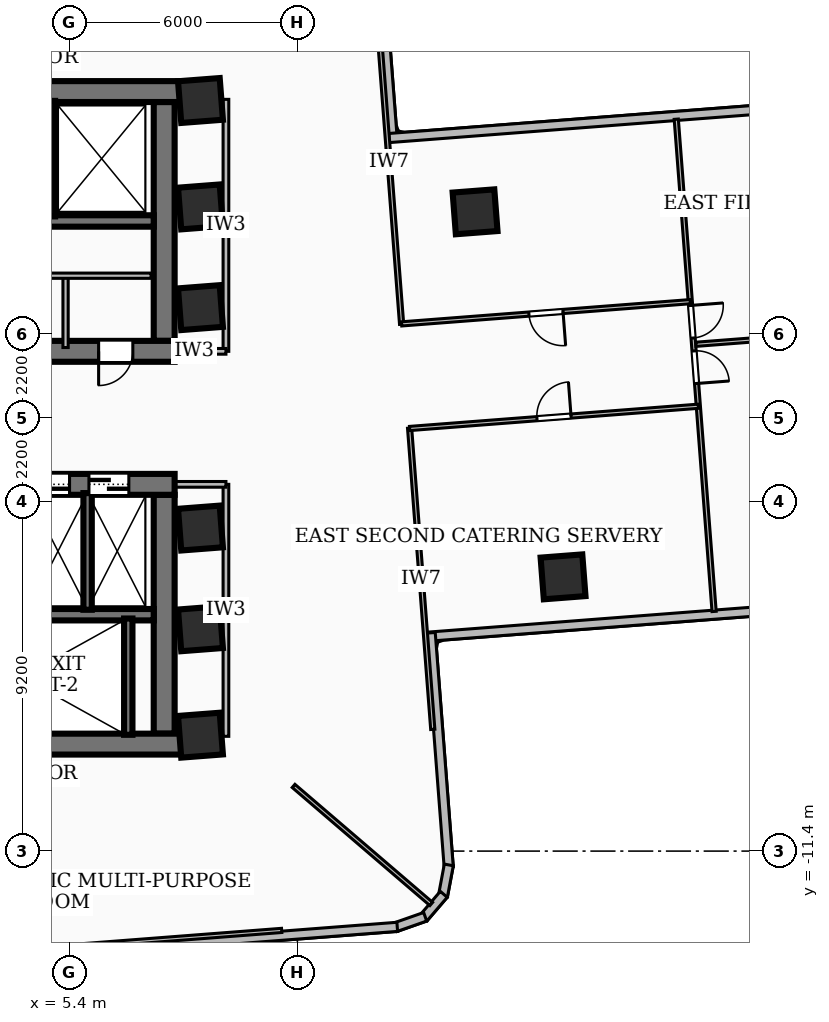
"""IFC4 building model, lengths in metres.
Left out: names, types, materials, properties, quantities, classifications, styles, units other than length and angle.
Written with IfcOpenShell. Run it as: python <this file> out.ifc"""

import sys

from ifc_helpers import new_model, si_unit, direction, frame, frame_2d, origin, origin_2d, place, context, subcontext, project, spatial, rectangle, extrude, element, fill, save


model = new_model("IFC4")
c1 = context("Model", 3, precision=1e-05, world=origin(), true_north=direction((0.0, 1.0)))
c2 = subcontext(c1, "Body", "Model", "MODEL_VIEW")
j1 = project(units=[si_unit("LENGTHUNIT", "METRE"), si_unit("PLANEANGLEUNIT", "RADIAN")], contexts=[c1])
p1 = place(None, origin())
s1 = spatial("IfcSite", under=j1, at=p1, CompositionType="ELEMENT")
p2 = place(p1, origin())
s2 = spatial("IfcBuilding", under=s1, at=p2, CompositionType="ELEMENT")
p3 = place(p2, frame((0.0, 0.0, 56.88)))
s3 = spatial("IfcBuildingStorey", under=s2, at=p3, CompositionType="ELEMENT", Elevation=56.88)
p4 = place(p3, frame((-8.78, 8.585, 0.0), z_axis=(0.0, 0.0, 1.0), x_axis=(1.0, 0.0, 0.0)))
e1 = element("IfcWall", 1, at=p4, inside=s3, PredefinedType="SHEAR", context=c2, shape_type="SweptSolid", body=[
    extrude(rectangle(XDim=17.56, YDim=0.55, at=frame_2d((8.78, 0.0))), origin(), (0.0, 0.0, 1.0), 3.32),
])
p5 = place(p3, frame((8.17, 1.75, 0.0), z_axis=(0.0, 0.0, 1.0), x_axis=(-1.0, 0.0, 0.0)))
e2 = element("IfcWall", 2, at=p5, inside=s3, PredefinedType="SHEAR", context=c2, shape_type="SweptSolid", body=[
    extrude(rectangle(XDim=16.34, YDim=0.55, at=frame_2d((8.17, 0.0))), origin(), (0.0, 0.0, 1.0), 3.32),
])
p6 = place(p5, frame((7.45, 0.0, 0.0)))
e3 = element("IfcOpeningElement", 3, at=p6, cuts=e2, PredefinedType="OPENING", context=c2, shape_type="SweptSolid", body=[
    extrude(rectangle(XDim=1.0, YDim=2.1, at=frame_2d((0.5, 1.05))), frame((0.0, 0.285, 0.0), z_axis=(0.0, -1.0, 0.0), x_axis=(1.0, 0.0, 0.0)), (0.0, 0.0, 1.0), 0.57),
])
p7 = place(p5, frame((3.4, 0.0, 0.0)))
e4 = element("IfcOpeningElement", 4, at=p7, cuts=e2, PredefinedType="OPENING", context=c2, shape_type="SweptSolid", body=[
    extrude(rectangle(XDim=0.9, YDim=2.06, at=frame_2d((0.45, 1.03))), frame((0.0, 0.285, 0.0), z_axis=(0.0, -1.0, 0.0), x_axis=(1.0, 0.0, 0.0)), (0.0, 0.0, 1.0), 0.57),
])
p8 = place(p5, frame((1.1, 0.0, 0.0)))
e5 = element("IfcOpeningElement", 5, at=p8, cuts=e2, PredefinedType="OPENING", context=c2, shape_type="SweptSolid", body=[
    extrude(rectangle(XDim=0.9, YDim=2.06, at=frame_2d((0.45, 1.03))), frame((0.0, 0.285, 0.0), z_axis=(0.0, -1.0, 0.0), x_axis=(1.0, 0.0, 0.0)), (0.0, 0.0, 1.0), 0.57),
])
p9 = place(p3, frame((7.895, 8.31, 0.0), z_axis=(0.0, 0.0, 1.0), x_axis=(0.0, -1.0, 0.0)))
e6 = element("IfcWall", 6, at=p9, inside=s3, PredefinedType="SHEAR", context=c2, shape_type="SweptSolid", body=[
    extrude(rectangle(XDim=6.285, YDim=0.55, at=frame_2d((3.143, 0.0))), origin(), (0.0, 0.0, 1.0), 3.32),
])
p10 = place(p3, frame((7.62, 5.18, 0.0), z_axis=(0.0, 0.0, 1.0), x_axis=(-1.0, 0.0, 0.0)))
e7 = element("IfcWall", 7, at=p10, inside=s3, PredefinedType="SOLIDWALL", context=c2, shape_type="SweptSolid", body=[
    extrude(rectangle(XDim=15.24, YDim=0.3, at=frame_2d((7.62, 0.0))), origin(), (0.0, 0.0, 1.0), 3.32),
])
p11 = place(p10, frame((5.77, 0.0, 0.0)))
e8 = element("IfcOpeningElement", 8, at=p11, cuts=e7, PredefinedType="OPENING", context=c2, shape_type="SweptSolid", body=[
    extrude(rectangle(XDim=1.1, YDim=2.15, at=frame_2d((0.55, 1.075))), frame((0.0, 0.16, 0.0), z_axis=(0.0, -1.0, 0.0), x_axis=(1.0, 0.0, 0.0)), (0.0, 0.0, 1.0), 0.32),
])
p12 = place(p10, frame((2.97, 0.0, 0.0)))
e9 = element("IfcOpeningElement", 9, at=p12, cuts=e7, PredefinedType="OPENING", context=c2, shape_type="SweptSolid", body=[
    extrude(rectangle(XDim=1.1, YDim=2.15, at=frame_2d((0.55, 1.075))), frame((0.0, 0.16, 0.0), z_axis=(0.0, -1.0, 0.0), x_axis=(1.0, 0.0, 0.0)), (0.0, 0.0, 1.0), 0.32),
])
p13 = place(p10, frame((7.97, 0.0, 0.0)))
e10 = element("IfcOpeningElement", 10, at=p13, cuts=e7, PredefinedType="OPENING", context=c2, shape_type="SweptSolid", body=[
    extrude(rectangle(XDim=1.0, YDim=2.1, at=frame_2d((0.5, 1.05))), frame((0.0, 0.16, 0.0), z_axis=(0.0, -1.0, 0.0), x_axis=(1.0, 0.0, 0.0)), (0.0, 0.0, 1.0), 0.32),
])
p14 = place(p3, frame((8.78, -8.585, 0.0), z_axis=(0.0, 0.0, 1.0), x_axis=(-1.0, 0.0, 0.0)))
e11 = element("IfcWall", 11, at=p14, inside=s3, PredefinedType="SHEAR", context=c2, shape_type="SweptSolid", body=[
    extrude(rectangle(XDim=17.56, YDim=0.55, at=frame_2d((8.78, 0.0))), origin(), (0.0, 0.0, 1.0), 3.32),
])
p15 = place(p3, frame((-8.17, -1.75, 0.0), z_axis=(0.0, 0.0, 1.0), x_axis=(1.0, 0.0, 0.0)))
e12 = element("IfcWall", 12, at=p15, inside=s3, PredefinedType="SHEAR", context=c2, shape_type="SweptSolid", body=[
    extrude(rectangle(XDim=16.34, YDim=0.55, at=frame_2d((8.17, 0.0))), origin(), (0.0, 0.0, 1.0), 3.32),
])
p16 = place(p15, frame((7.45, 0.0, 0.0)))
e13 = element("IfcOpeningElement", 13, at=p16, cuts=e12, PredefinedType="OPENING", context=c2, shape_type="SweptSolid", body=[
    extrude(rectangle(XDim=1.0, YDim=2.1, at=frame_2d((0.5, 1.05))), frame((0.0, 0.285, 0.0), z_axis=(0.0, -1.0, 0.0), x_axis=(1.0, 0.0, 0.0)), (0.0, 0.0, 1.0), 0.57),
])
p17 = place(p15, frame((10.965, 0.0, 0.0)))
e14 = element("IfcOpeningElement", 14, at=p17, cuts=e12, PredefinedType="OPENING", context=c2, shape_type="SweptSolid", body=[
    extrude(rectangle(XDim=1.05, YDim=2.15, at=frame_2d((0.525, 1.075))), frame((0.0, 0.285, 0.0), z_axis=(0.0, -1.0, 0.0), x_axis=(1.0, 0.0, 0.0)), (0.0, 0.0, 1.0), 0.57),
])
p18 = place(p15, frame((12.525, 0.0, 0.0)))
e15 = element("IfcOpeningElement", 15, at=p18, cuts=e12, PredefinedType="OPENING", context=c2, shape_type="SweptSolid", body=[
    extrude(rectangle(XDim=1.05, YDim=2.15, at=frame_2d((0.525, 1.075))), frame((0.0, 0.285, 0.0), z_axis=(0.0, -1.0, 0.0), x_axis=(1.0, 0.0, 0.0)), (0.0, 0.0, 1.0), 0.57),
])
p19 = place(p15, frame((14.085, 0.0, 0.0)))
e16 = element("IfcOpeningElement", 16, at=p19, cuts=e12, PredefinedType="OPENING", context=c2, shape_type="SweptSolid", body=[
    extrude(rectangle(XDim=1.05, YDim=2.15, at=frame_2d((0.525, 1.075))), frame((0.0, 0.285, 0.0), z_axis=(0.0, -1.0, 0.0), x_axis=(1.0, 0.0, 0.0)), (0.0, 0.0, 1.0), 0.57),
])
p20 = place(p3, frame((7.895, -2.025, 0.0), z_axis=(0.0, 0.0, 1.0), x_axis=(0.0, -1.0, 0.0)))
e17 = element("IfcWall", 17, at=p20, inside=s3, PredefinedType="SHEAR", context=c2, shape_type="SweptSolid", body=[
    extrude(rectangle(XDim=6.285, YDim=0.55, at=frame_2d((3.143, 0.0))), origin(), (0.0, 0.0, 1.0), 3.32),
])
p21 = place(p3, frame((-7.62, -5.18, 0.0), z_axis=(0.0, 0.0, 1.0), x_axis=(1.0, 0.0, 0.0)))
e18 = element("IfcWall", 18, at=p21, inside=s3, PredefinedType="SOLIDWALL", context=c2, shape_type="SweptSolid", body=[
    extrude(rectangle(XDim=15.24, YDim=0.3, at=frame_2d((7.62, 0.0))), origin(), (0.0, 0.0, 1.0), 3.32),
])
p22 = place(p21, frame((5.77, 0.0, 0.0)))
e19 = element("IfcOpeningElement", 19, at=p22, cuts=e18, PredefinedType="OPENING", context=c2, shape_type="SweptSolid", body=[
    extrude(rectangle(XDim=1.1, YDim=2.15, at=frame_2d((0.55, 1.075))), frame((0.0, 0.16, 0.0), z_axis=(0.0, -1.0, 0.0), x_axis=(1.0, 0.0, 0.0)), (0.0, 0.0, 1.0), 0.32),
])
p23 = place(p21, frame((7.97, 0.0, 0.0)))
e20 = element("IfcOpeningElement", 20, at=p23, cuts=e18, PredefinedType="OPENING", context=c2, shape_type="SweptSolid", body=[
    extrude(rectangle(XDim=1.0, YDim=2.1, at=frame_2d((0.5, 1.05))), frame((0.0, 0.16, 0.0), z_axis=(0.0, -1.0, 0.0), x_axis=(1.0, 0.0, 0.0)), (0.0, 0.0, 1.0), 0.32),
])
p24 = place(p3, frame((6.95, -8.34, 0.0), z_axis=(0.0, 0.0, 1.0), x_axis=(0.0, 1.0, 0.0)))
e21 = element("IfcWall", 21, at=p24, inside=s3, PredefinedType="SOLIDWALL", context=c2, shape_type="SweptSolid", body=[
    extrude(rectangle(XDim=3.06, YDim=0.22, at=frame_2d((1.53, 0.0))), origin(), (0.0, 0.0, 1.0), 3.32),
])
p25 = place(p3, frame((4.9, 5.3, 0.0), z_axis=(0.0, 0.0, 1.0), x_axis=(0.0, 1.0, 0.0)))
e22 = element("IfcWall", 22, at=p25, inside=s3, PredefinedType="SOLIDWALL", context=c2, shape_type="SweptSolid", body=[
    extrude(rectangle(XDim=3.04, YDim=0.25, at=frame_2d((1.52, 0.0))), origin(), (0.0, 0.0, 1.0), 3.32),
])
p26 = place(p3, frame((5.88, -5.05, 0.0), z_axis=(0.0, 0.0, 1.0), x_axis=(0.0, 1.0, 0.0)))
e23 = element("IfcWall", 23, at=p26, inside=s3, PredefinedType="SOLIDWALL", context=c2, shape_type="SweptSolid", body=[
    extrude(rectangle(XDim=3.07, YDim=0.22, at=frame_2d((1.535, 0.0))), origin(), (0.0, 0.0, 1.0), 3.32),
])
for number, where, z_axis, x_axis in (
    (24, (8.85, -5.55, 0.0), (0.0, 0.0, 1.0), (0.997, 0.077, 0.0)),
    (25, (8.85, -2.9, 0.0), (0.0, 0.0, 1.0), (0.997, 0.077, 0.0)),
    (26, (8.85, 2.9, 0.0), (0.0, 0.0, 1.0), (0.997, 0.077, 0.0)),
    (27, (8.85, 5.55, 0.0), (0.0, 0.0, 1.0), (0.997, 0.077, 0.0)),
    (28, (8.85, -8.35, 0.0), (0.0, 0.0, 1.0), (0.997, 0.077, 0.0)),
    (29, (8.85, 8.35, 0.0), (0.0, 0.0, 1.0), (0.997, 0.077, 0.0)),
    (30, (18.391, -4.184, 0.0), (0.0, 0.0, 1.0), (0.997, 0.077, 0.0)),
    (31, (16.076, 5.421, 0.0), (0.0, 0.0, 1.0), (0.997, 0.077, 0.0)),
):
    element("IfcColumn", number, at=place(p3, frame(where, z_axis=z_axis, x_axis=x_axis)), inside=s3, PredefinedType="COLUMN", context=c2, shape_type="SweptSolid", body=[
        extrude(rectangle(XDim=1.1, YDim=1.1, at=origin_2d()), origin(), (0.0, 0.0, 1.0), 3.6),
    ])
p27 = place(p3, frame((13.393, 14.028, 0.0), z_axis=(0.0, 0.0, 1.0), x_axis=(0.076754366588, -0.997050032451, 0.0)))
e32 = element("IfcWall", 32, at=p27, inside=s3, PredefinedType="SOLIDWALL", context=c2, shape_type="SweptSolid", body=[
    extrude(rectangle(XDim=6.775, YDim=0.24, at=frame_2d((3.388, 0.0))), origin(), (0.0, 0.0, 1.0), 3.32),
])
p28 = place(p3, frame((13.81, 7.362, 0.0), z_axis=(0.0, 0.0, 1.0), x_axis=(0.997055761943, 0.076679903335, 0.0)))
e33 = element("IfcWall", 33, at=p28, inside=s3, PredefinedType="SOLIDWALL", context=c2, shape_type="SweptSolid", body=[
    extrude(rectangle(XDim=16.875, YDim=0.24, at=frame_2d((8.438, 0.0))), origin(), (0.0, 0.0, 1.0), 3.32),
])
p29 = place(p28, frame((13.375, 0.0, 0.85)))
e34 = element("IfcOpeningElement", 34, at=p29, cuts=e33, PredefinedType="OPENING", context=c2, shape_type="SweptSolid", body=[
    extrude(rectangle(XDim=2.4, YDim=1.65, at=frame_2d((1.2, 0.825))), frame((0.0, 0.13, 0.0), z_axis=(0.0, -1.0, 0.0), x_axis=(1.0, 0.0, 0.0)), (0.0, 0.0, 1.0), 0.26),
])
p30 = place(p3, frame((31.645, -4.465, 0.0), z_axis=(0.0, 0.0, 1.0), x_axis=(-0.997051676532, -0.076733006752, 0.0)))
e35 = element("IfcWall", 35, at=p30, inside=s3, PredefinedType="SOLIDWALL", context=c2, shape_type="SweptSolid", body=[
    extrude(rectangle(XDim=16.876, YDim=0.24, at=frame_2d((8.438, 0.0))), origin(), (0.0, 0.0, 1.0), 3.32),
])
p31 = place(p30, frame((1.1, 0.0, 0.85)))
e36 = element("IfcOpeningElement", 36, at=p31, cuts=e35, PredefinedType="OPENING", context=c2, shape_type="SweptSolid", body=[
    extrude(rectangle(XDim=1.8, YDim=2.0, at=frame_2d((0.9, 1.0))), frame((0.0, 0.13, 0.0), z_axis=(0.0, -1.0, 0.0), x_axis=(1.0, 0.0, 0.0)), (0.0, 0.0, 1.0), 0.26),
])
p32 = place(p3, frame((14.908, -5.657, 0.0), z_axis=(0.0, 0.0, 1.0), x_axis=(0.076778128006, -0.997048202977, 0.0)))
e37 = element("IfcWall", 37, at=p32, inside=s3, PredefinedType="SOLIDWALL", context=c2, shape_type="SweptSolid", body=[
    extrude(rectangle(XDim=6.175, YDim=0.24, at=frame_2d((3.088, 0.0))), origin(), (0.0, 0.0, 1.0), 3.32),
])
p33 = place(p3, frame((15.385, -11.764, 0.0), z_axis=(0.0, 0.0, 1.0), x_axis=(-0.185263427582, -0.982688894005, 0.0)))
e38 = element("IfcWall", 38, at=p33, inside=s3, PredefinedType="SOLIDWALL", context=c2, shape_type="SweptSolid", body=[
    extrude(rectangle(XDim=0.832, YDim=0.24, at=frame_2d((0.416, 0.0))), origin(), (0.0, 0.0, 1.0), 3.32),
])
p34 = place(p3, frame((15.252, -12.537, 0.0), z_axis=(0.0, 0.0, 1.0), x_axis=(-0.650371098657, -0.759616636226, 0.0)))
e39 = element("IfcWall", 39, at=p34, inside=s3, PredefinedType="SOLIDWALL", context=c2, shape_type="SweptSolid", body=[
    extrude(rectangle(XDim=0.813, YDim=0.24, at=frame_2d((0.407, 0.0))), origin(), (0.0, 0.0, 1.0), 3.32),
])
p35 = place(p3, frame((14.763, -13.128, 0.0), z_axis=(0.0, 0.0, 1.0), x_axis=(-0.943569376564, -0.331174926, 0.0)))
e40 = element("IfcWall", 40, at=p35, inside=s3, PredefinedType="SOLIDWALL", context=c2, shape_type="SweptSolid", body=[
    extrude(rectangle(XDim=0.831, YDim=0.24, at=frame_2d((0.416, 0.0))), origin(), (0.0, 0.0, 1.0), 3.32),
])
p36 = place(p3, frame((14.028, -13.393, 0.0), z_axis=(0.0, 0.0, 1.0), x_axis=(-0.997050032451, -0.076754366588, 0.0)))
e41 = element("IfcWall", 41, at=p36, inside=s3, PredefinedType="SOLIDWALL", context=c2, shape_type="SweptSolid", body=[
    extrude(rectangle(XDim=6.775, YDim=0.24, at=frame_2d((3.388, 0.0))), origin(), (0.0, 0.0, 1.0), 3.32),
])
p37 = place(p3, frame((2.9, 3.74, 0.0), z_axis=(0.0, 0.0, 1.0), x_axis=(1.0, 0.0, 0.0)))
e42 = element("IfcWall", 42, at=p37, inside=s3, PredefinedType="PARTITIONING", context=c2, shape_type="SweptSolid", body=[
    extrude(rectangle(XDim=4.65, YDim=0.138, at=frame_2d((2.325, 0.0))), origin(), (0.0, 0.0, 1.0), 3.32),
])
p38 = place(p3, frame((5.3, 1.85, 0.0), z_axis=(0.0, 0.0, 1.0), x_axis=(0.0, 1.0, 0.0)))
e43 = element("IfcWall", 43, at=p38, inside=s3, PredefinedType="PARTITIONING", context=c2, shape_type="SweptSolid", body=[
    extrude(rectangle(XDim=1.89, YDim=0.138, at=frame_2d((0.945, 0.0))), origin(), (0.0, 0.0, 1.0), 2.385),
])
p39 = place(p3, frame((9.52, 1.75, 0.0), z_axis=(0.0, 0.0, 1.0), x_axis=(0.0, 1.0, 0.0)))
e44 = element("IfcWall", 44, at=p39, inside=s3, PredefinedType="PARTITIONING", context=c2, shape_type="SweptSolid", body=[
    extrude(rectangle(XDim=6.63, YDim=0.15, at=frame_2d((3.315, 0.0))), origin(), (0.0, 0.0, 1.0), 2.401),
])
p40 = place(p3, frame((7.85, 1.75, 0.0), z_axis=(0.0, 0.0, 1.0), x_axis=(1.0, 0.0, 0.0)))
e45 = element("IfcWall", 45, at=p40, inside=s3, PredefinedType="PARTITIONING", context=c2, shape_type="SweptSolid", body=[
    extrude(rectangle(XDim=1.67, YDim=0.15, at=frame_2d((0.835, 0.0))), origin(), (0.0, 0.0, 1.0), 2.385),
])
p41 = place(p3, frame((9.52, -8.38, 0.0), z_axis=(0.0, 0.0, 1.0), x_axis=(0.0, 1.0, 0.0)))
e46 = element("IfcWall", 46, at=p41, inside=s3, PredefinedType="PARTITIONING", context=c2, shape_type="SweptSolid", body=[
    extrude(rectangle(XDim=6.63, YDim=0.15, at=frame_2d((3.315, 0.0))), origin(), (0.0, 0.0, 1.0), 2.401),
])
p42 = place(p3, frame((7.85, -1.75, 0.0), z_axis=(0.0, 0.0, 1.0), x_axis=(1.0, 0.0, 0.0)))
e47 = element("IfcWall", 47, at=p42, inside=s3, PredefinedType="PARTITIONING", context=c2, shape_type="SweptSolid", body=[
    extrude(rectangle(XDim=1.67, YDim=0.15, at=frame_2d((0.835, 0.0))), origin(), (0.0, 0.0, 1.0), 2.385),
])
p43 = place(p3, frame((11.3, -9.685, 0.0), z_axis=(0.0, 0.0, 1.0), x_axis=(0.759206042513, -0.650850355313, 0.0)))
e48 = element("IfcWall", 48, at=p43, inside=s3, PredefinedType="PARTITIONING", context=c2, shape_type="SweptSolid", body=[
    extrude(rectangle(XDim=4.772, YDim=0.11, at=frame_2d((2.386, 0.0))), origin(), (0.0, 0.0, 1.0), 3.32),
])
p44 = place(p3, frame((14.143, 2.462, 0.0), z_axis=(0.0, 0.0, 1.0), x_axis=(-0.076722700704, 0.997052469631, 0.0)))
e49 = element("IfcWall", 49, at=p44, inside=s3, PredefinedType="PARTITIONING", context=c2, shape_type="SweptSolid", body=[
    extrude(rectangle(XDim=8.55, YDim=0.11, at=frame_2d((4.275, 0.0))), origin(), (0.0, 0.0, 1.0), 2.401),
])
p45 = place(p3, frame((14.963, -8.197, 0.0), z_axis=(0.0, 0.0, 1.0), x_axis=(-0.076708240121, 0.99705358226, 0.0)))
e50 = element("IfcWall", 50, at=p45, inside=s3, PredefinedType="PARTITIONING", context=c2, shape_type="SweptSolid", body=[
    extrude(rectangle(XDim=7.95, YDim=0.11, at=frame_2d((3.975, 0.0))), origin(), (0.0, 0.0, 1.0), 2.401),
])
p46 = place(p3, frame((21.74, 3.057, 0.0), z_axis=(0.0, 0.0, 1.0), x_axis=(-0.997049394946, -0.076762647418, 0.0)))
e51 = element("IfcWall", 51, at=p46, inside=s3, PredefinedType="PARTITIONING", context=c2, shape_type="SweptSolid", body=[
    extrude(rectangle(XDim=7.62, YDim=0.11, at=frame_2d((3.81, 0.0))), origin(), (0.0, 0.0, 1.0), 3.32),
])
p47 = place(p46, frame((3.36, 0.0, 0.0)))
e52 = element("IfcOpeningElement", 52, at=p47, cuts=e51, PredefinedType="OPENING", context=c2, shape_type="SweptSolid", body=[
    extrude(rectangle(XDim=0.9, YDim=2.06, at=frame_2d((0.45, 1.03))), frame((0.0, 0.065, 0.0), z_axis=(0.0, -1.0, 0.0), x_axis=(1.0, 0.0, 0.0)), (0.0, 0.0, 1.0), 0.13),
])
p48 = place(p3, frame((14.354, -0.28, 0.0), z_axis=(0.0, 0.0, 1.0), x_axis=(0.997048639669, 0.076772456877, 0.0)))
e53 = element("IfcWall", 53, at=p48, inside=s3, PredefinedType="PARTITIONING", context=c2, shape_type="SweptSolid", body=[
    extrude(rectangle(XDim=7.619, YDim=0.11, at=frame_2d((3.81, 0.0))), origin(), (0.0, 0.0, 1.0), 3.32),
])
p49 = place(p48, frame((3.36, 0.0, 0.0)))
e54 = element("IfcOpeningElement", 54, at=p49, cuts=e53, PredefinedType="OPENING", context=c2, shape_type="SweptSolid", body=[
    extrude(rectangle(XDim=0.9, YDim=2.06, at=frame_2d((0.45, 1.03))), frame((0.0, 0.065, 0.0), z_axis=(0.0, -1.0, 0.0), x_axis=(1.0, 0.0, 0.0)), (0.0, 0.0, 1.0), 0.13),
])
p50 = place(p3, frame((21.886, 1.935, 0.0), z_axis=(0.0, 0.0, 1.0), x_axis=(0.997054350339, 0.076698255973, 0.0)))
e55 = element("IfcWall", 55, at=p50, inside=s3, PredefinedType="PARTITIONING", context=c2, shape_type="SweptSolid", body=[
    extrude(rectangle(XDim=10.625, YDim=0.11, at=frame_2d((5.312, 0.0))), origin(), (0.0, 0.0, 1.0), 2.812),
])
p51 = place(p3, frame((21.37, 7.858, 0.0), z_axis=(0.0, 0.0, 1.0), x_axis=(0.076662005745, -0.99705713822, 0.0)))
e56 = element("IfcWall", 56, at=p51, inside=s3, PredefinedType="PARTITIONING", context=c2, shape_type="SweptSolid", body=[
    extrude(rectangle(XDim=12.99, YDim=0.11, at=frame_2d((6.495, 0.0))), origin(), (0.0, 0.0, 1.0), 2.401),
])
p52 = place(p51, frame((6.115, 0.0, 0.0)))
e57 = element("IfcOpeningElement", 57, at=p52, cuts=e56, PredefinedType="OPENING", context=c2, shape_type="SweptSolid", body=[
    extrude(rectangle(XDim=0.86, YDim=2.04, at=frame_2d((0.43, 1.02))), frame((0.0, 0.065, 0.0), z_axis=(0.0, -1.0, 0.0), x_axis=(1.0, 0.0, 0.0)), (0.0, 0.0, 1.0), 0.13),
])
p53 = place(p51, frame((4.915, 0.0, 0.0)))
e58 = element("IfcOpeningElement", 58, at=p53, cuts=e56, PredefinedType="OPENING", context=c2, shape_type="SweptSolid", body=[
    extrude(rectangle(XDim=0.86, YDim=2.04, at=frame_2d((0.43, 1.02))), frame((0.0, 0.065, 0.0), z_axis=(0.0, -1.0, 0.0), x_axis=(1.0, 0.0, 0.0)), (0.0, 0.0, 1.0), 0.13),
])
p54 = place(p3, frame((2.462, -14.143, 0.0), z_axis=(0.0, 0.0, 1.0), x_axis=(0.997052469631, 0.076722700704, 0.0)))
e59 = element("IfcWall", 59, at=p54, inside=s3, PredefinedType="PARTITIONING", context=c2, shape_type="SweptSolid", body=[
    extrude(rectangle(XDim=8.55, YDim=0.11, at=frame_2d((4.275, 0.0))), origin(), (0.0, 0.0, 1.0), 2.401),
])
p55 = place(p18, origin())
e60 = element("IfcDoor", 60, at=p55, inside=s3, OperationType="DOUBLE_DOOR_SLIDING", PredefinedType="DOOR", context=c2, shape_type="SweptSolid", body=[
    extrude(rectangle(XDim=1.05, YDim=2.15, at=frame_2d((0.525, 1.075))), frame((0.0, 0.025, 0.0), z_axis=(0.0, -1.0, 0.0), x_axis=(1.0, 0.0, 0.0)), (0.0, 0.0, 1.0), 0.05),
])
fill(e15, e60)
p56 = place(p19, origin())
e61 = element("IfcDoor", 61, at=p56, inside=s3, OperationType="DOUBLE_DOOR_SLIDING", PredefinedType="DOOR", context=c2, shape_type="SweptSolid", body=[
    extrude(rectangle(XDim=1.05, YDim=2.15, at=frame_2d((0.525, 1.075))), frame((0.0, 0.025, 0.0), z_axis=(0.0, -1.0, 0.0), x_axis=(1.0, 0.0, 0.0)), (0.0, 0.0, 1.0), 0.05),
])
fill(e16, e61)
p57 = place(p8, origin())
e62 = element("IfcDoor", 62, at=p57, inside=s3, OperationType="SINGLE_SWING_RIGHT", PredefinedType="DOOR", context=c2, shape_type="SweptSolid", body=[
    extrude(rectangle(XDim=0.9, YDim=2.06, at=frame_2d((0.45, 1.03))), frame((0.0, 0.025, 0.0), z_axis=(0.0, -1.0, 0.0), x_axis=(1.0, 0.0, 0.0)), (0.0, 0.0, 1.0), 0.05),
])
fill(e5, e62)
p58 = place(p47, origin())
e63 = element("IfcDoor", 63, at=p58, inside=s3, OperationType="SINGLE_SWING_LEFT", PredefinedType="DOOR", context=c2, shape_type="SweptSolid", body=[
    extrude(rectangle(XDim=0.9, YDim=2.06, at=frame_2d((0.45, 1.03))), frame((0.0, 0.025, 0.0), z_axis=(0.0, -1.0, 0.0), x_axis=(1.0, 0.0, 0.0)), (0.0, 0.0, 1.0), 0.05),
])
fill(e52, e63)
p59 = place(p49, origin())
e64 = element("IfcDoor", 64, at=p59, inside=s3, OperationType="SINGLE_SWING_RIGHT", PredefinedType="DOOR", context=c2, shape_type="SweptSolid", body=[
    extrude(rectangle(XDim=0.9, YDim=2.06, at=frame_2d((0.45, 1.03))), frame((0.0, 0.025, 0.0), z_axis=(0.0, -1.0, 0.0), x_axis=(1.0, 0.0, 0.0)), (0.0, 0.0, 1.0), 0.05),
])
fill(e54, e64)
p60 = place(p52, origin())
e65 = element("IfcDoor", 65, at=p60, inside=s3, OperationType="SINGLE_SWING_RIGHT", PredefinedType="DOOR", context=c2, shape_type="SweptSolid", body=[
    extrude(rectangle(XDim=0.86, YDim=2.04, at=frame_2d((0.43, 1.02))), frame((0.0, 0.025, 0.0), z_axis=(0.0, -1.0, 0.0), x_axis=(1.0, 0.0, 0.0)), (0.0, 0.0, 1.0), 0.05),
])
fill(e57, e65)
p61 = place(p53, origin())
e66 = element("IfcDoor", 66, at=p61, inside=s3, OperationType="SINGLE_SWING_LEFT", PredefinedType="DOOR", context=c2, shape_type="SweptSolid", body=[
    extrude(rectangle(XDim=0.86, YDim=2.04, at=frame_2d((0.43, 1.02))), frame((0.0, 0.025, 0.0), z_axis=(0.0, -1.0, 0.0), x_axis=(1.0, 0.0, 0.0)), (0.0, 0.0, 1.0), 0.05),
])
fill(e58, e66)
save(model, sys.argv[1])
